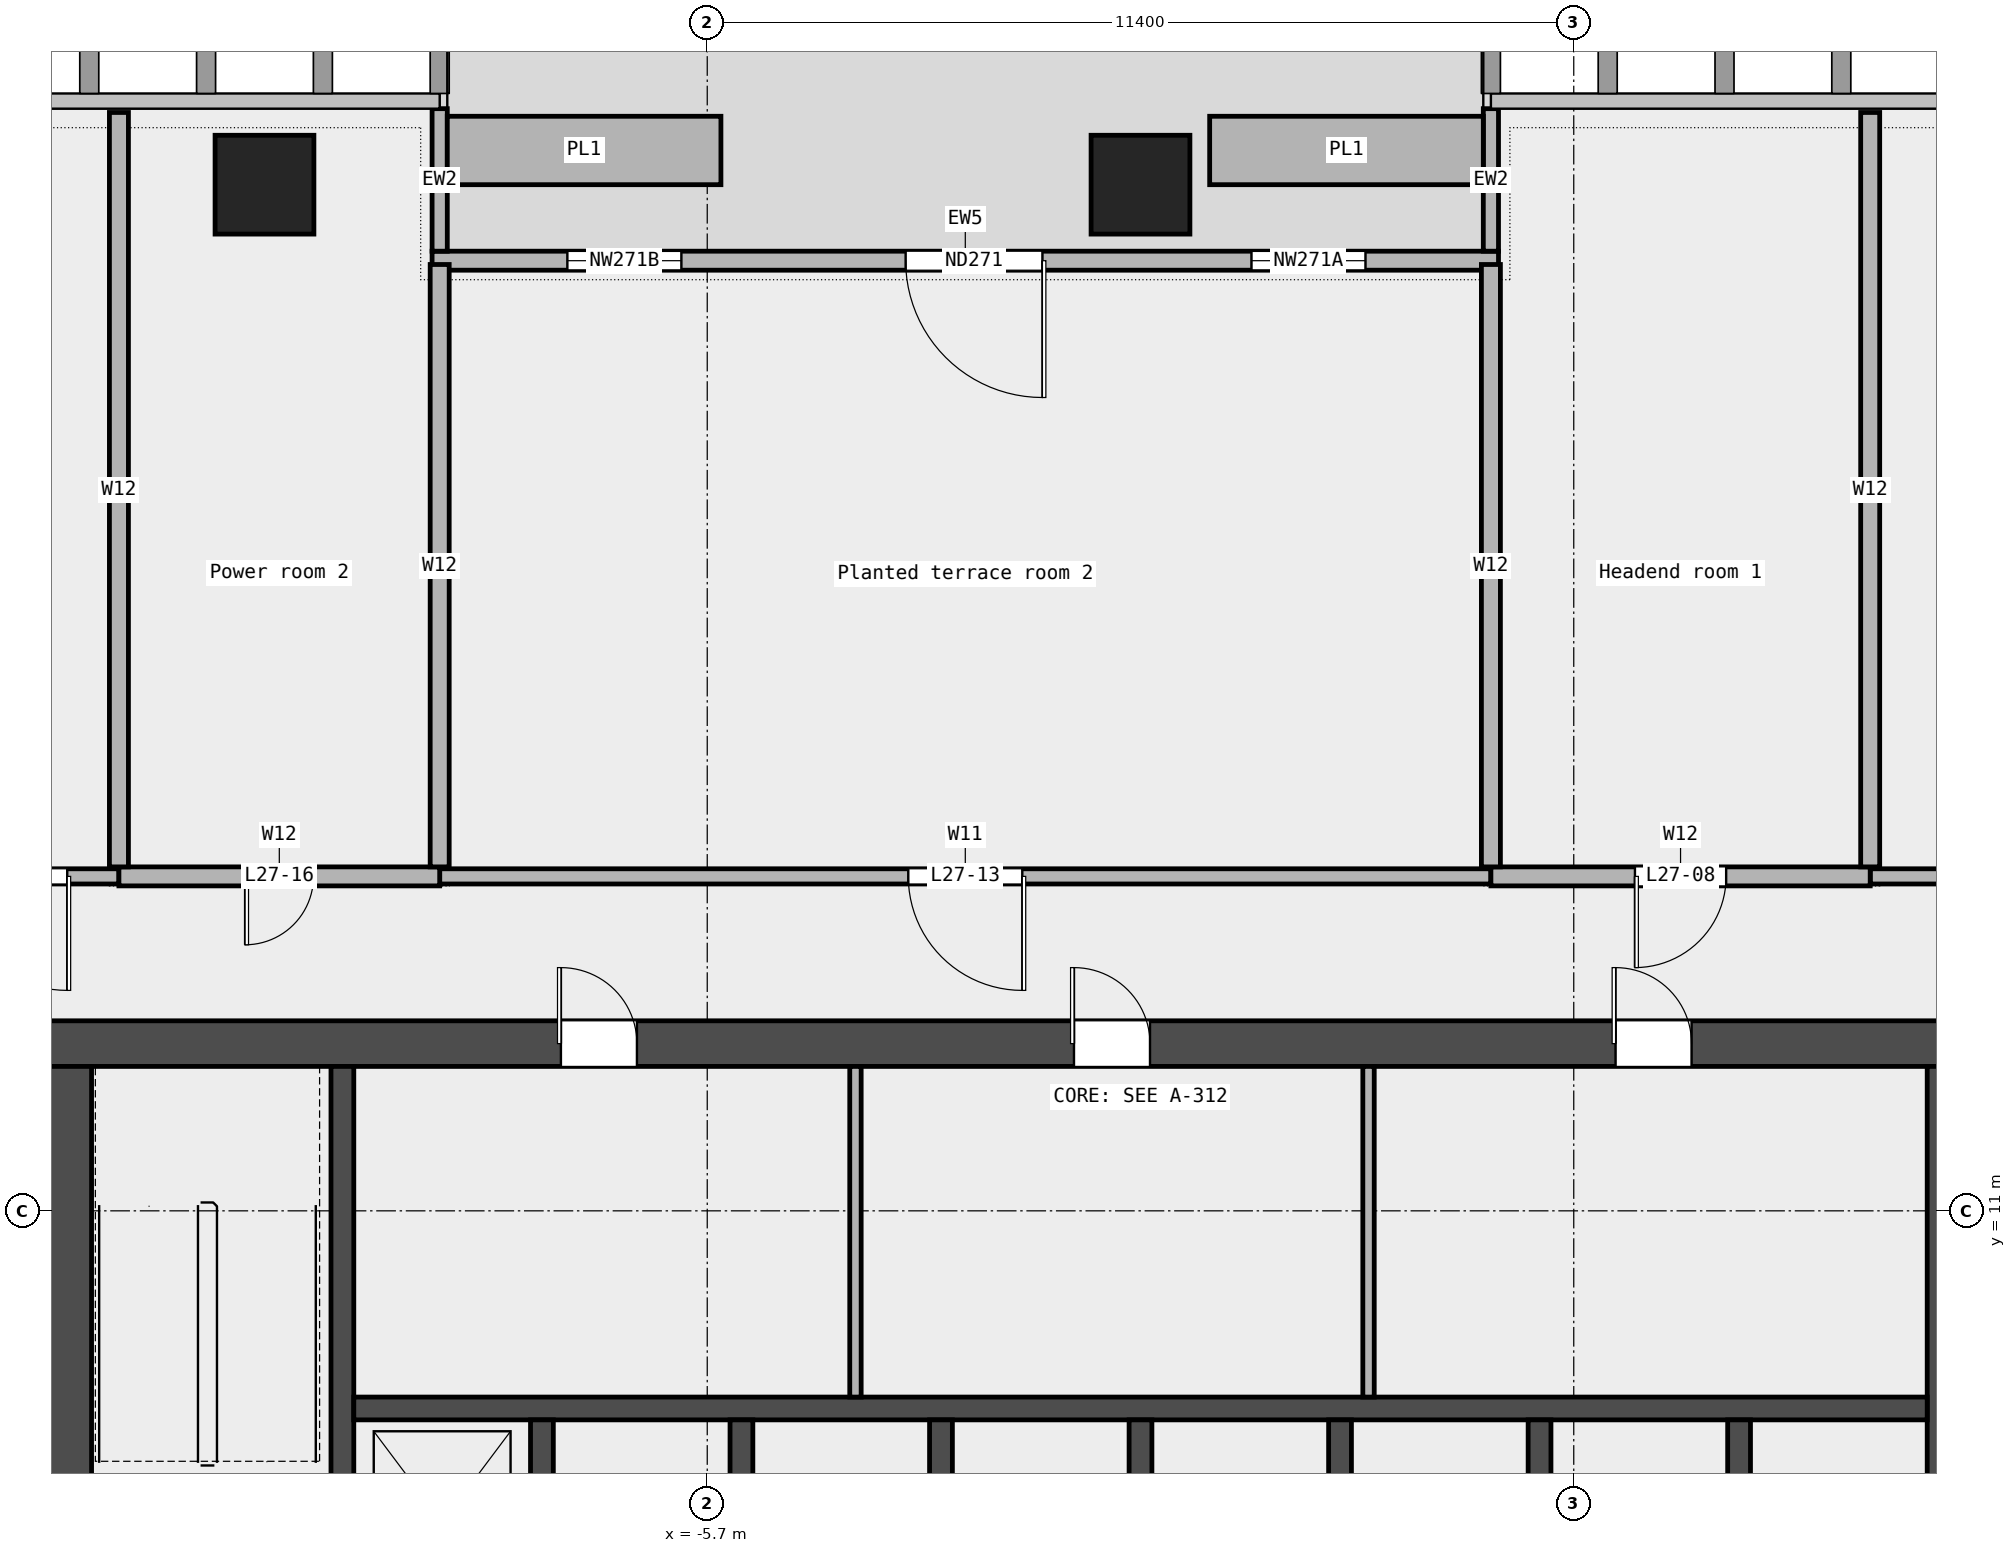
"""IFC4 building model, lengths in metres.
Left out: names, types, materials, properties, quantities, classifications, styles, units other than length and angle.
Written with IfcOpenShell. Run it as: python <this file> out.ifc"""

import sys

from ifc_helpers import new_model, si_unit, direction, frame, frame_2d, origin, origin_2d, place, context, subcontext, project, spatial, rectangle, extrude, element, fill, save


model = new_model("IFC4")
c1 = context("Model", 3, precision=1e-05, world=origin(), true_north=direction((0.0, 1.0)))
c2 = subcontext(c1, "Body", "Model", "MODEL_VIEW")
j1 = project(units=[si_unit("LENGTHUNIT", "METRE"), si_unit("PLANEANGLEUNIT", "RADIAN")], contexts=[c1])
p1 = place(None, origin())
s1 = spatial("IfcSite", under=j1, at=p1, CompositionType="ELEMENT")
p2 = place(p1, origin())
s2 = spatial("IfcBuilding", under=s1, at=p2, CompositionType="ELEMENT")
p3 = place(p2, frame((0.0, 0.0, 135.1)))
s3 = spatial("IfcBuildingStorey", under=s2, at=p3, CompositionType="ELEMENT", Elevation=135.1)
for number, where, z_axis, x_axis in (
    (1, (0.0, 24.5, 0.0), (0.0, 0.0, 1.0), (1.0, 0.0, 0.0)),
    (2, (-11.525, 24.5, 0.0), (0.0, 0.0, 1.0), (1.0, 0.0, 0.0)),
):
    element("IfcColumn", number, at=place(p3, frame(where, z_axis=z_axis, x_axis=x_axis)), inside=s3, PredefinedType="COLUMN", context=c2, shape_type="SweptSolid", body=[
        extrude(rectangle(XDim=1.3, YDim=1.3, at=origin_2d()), origin(), (0.0, 0.0, 1.0), 4.05),
    ])
p4 = place(p3, frame((4.71, 23.5, 0.0), z_axis=(0.0, 0.0, 1.0), x_axis=(-1.0, 0.0, 0.0)))
e3 = element("IfcWall", 3, at=p4, inside=s3, PredefinedType="STANDARD", context=c2, shape_type="SweptSolid", body=[
    extrude(rectangle(XDim=14.03, YDim=0.25, at=frame_2d((7.015, 0.0))), origin(), (0.0, 0.0, 1.0), 4.05),
])
p5 = place(p4, frame((1.75, 0.0, 0.45)))
e4 = element("IfcOpeningElement", 4, at=p5, cuts=e3, PredefinedType="OPENING", context=c2, shape_type="SweptSolid", body=[
    extrude(rectangle(XDim=1.5, YDim=3.0, at=frame_2d((0.75, 1.5))), frame((0.0, 0.137, 0.0), z_axis=(0.0, -1.0, 0.0), x_axis=(1.0, 0.0, 0.0)), (0.0, 0.0, 1.0), 0.274),
])
p6 = place(p4, frame((6.0, 0.0, 0.0)))
e5 = element("IfcOpeningElement", 5, at=p6, cuts=e3, PredefinedType="OPENING", context=c2, shape_type="SweptSolid", body=[
    extrude(rectangle(XDim=1.8, YDim=2.4, at=frame_2d((0.9, 1.2))), frame((0.0, 0.137, 0.0), z_axis=(0.0, -1.0, 0.0), x_axis=(1.0, 0.0, 0.0)), (0.0, 0.0, 1.0), 0.274),
])
p7 = place(p4, frame((10.75, 0.0, 0.45)))
e6 = element("IfcOpeningElement", 6, at=p7, cuts=e3, PredefinedType="OPENING", context=c2, shape_type="SweptSolid", body=[
    extrude(rectangle(XDim=1.5, YDim=3.0, at=frame_2d((0.75, 1.5))), frame((0.0, 0.137, 0.0), z_axis=(0.0, -1.0, 0.0), x_axis=(1.0, 0.0, 0.0)), (0.0, 0.0, 1.0), 0.274),
])
for number, where, z_axis, x_axis in (
    (7, (4.61, 25.5, 0.0), (0.0, 0.0, 1.0), (0.0, -1.0, 0.0)),
    (8, (-9.22, 25.5, 0.0), (0.0, 0.0, 1.0), (0.0, -1.0, 0.0)),
):
    element("IfcWall", number, at=place(p3, frame(where, z_axis=z_axis, x_axis=x_axis)), inside=s3, PredefinedType="STANDARD", context=c2, shape_type="SweptSolid", body=[
        extrude(rectangle(XDim=1.875, YDim=0.2, at=frame_2d((0.938, 0.0))), origin(), (0.0, 0.0, 1.0), 4.05),
    ])
for number, where, z_axis, x_axis in (
    (9, (4.51, 24.95, 0.0), (0.0, 0.0, 1.0), (-1.0, 0.0, 0.0)),
    (10, (-5.52, 24.95, 0.0), (0.0, 0.0, 1.0), (-1.0, 0.0, 0.0)),
):
    element("IfcWall", number, at=place(p3, frame(where, z_axis=z_axis, x_axis=x_axis)), inside=s3, PredefinedType="STANDARD", context=c2, shape_type="SweptSolid", body=[
        extrude(rectangle(XDim=3.6, YDim=0.9, at=frame_2d((1.8, 0.0))), origin(), (0.0, 0.0, 1.0), 0.7),
    ])
p8 = place(p3, frame((-16.3, 15.4, 0.0), z_axis=(0.0, 0.0, 1.0), x_axis=(1.0, 0.0, 0.0)))
e11 = element("IfcWall", 11, at=p8, inside=s3, PredefinedType="PARTITIONING", context=c2, shape_type="SweptSolid", body=[
    extrude(rectangle(XDim=2.86, YDim=0.2, at=frame_2d((1.43, 0.0))), origin(), (0.0, 0.0, 1.0), 4.05),
])
p9 = place(p8, frame((0.68, 0.0, 0.0)))
e12 = element("IfcOpeningElement", 12, at=p9, cuts=e11, PredefinedType="OPENING", context=c2, shape_type="SweptSolid", body=[
    extrude(rectangle(XDim=1.5, YDim=2.1, at=frame_2d((0.75, 1.05))), frame((0.0, 0.112, 0.0), z_axis=(0.0, -1.0, 0.0), x_axis=(1.0, 0.0, 0.0)), (0.0, 0.0, 1.0), 0.224),
])
p10 = place(p3, frame((-9.22, 15.4, 0.0), z_axis=(0.0, 0.0, 1.0), x_axis=(1.0, 0.0, 0.0)))
e13 = element("IfcWall", 13, at=p10, inside=s3, PredefinedType="PARTITIONING", context=c2, shape_type="SweptSolid", body=[
    extrude(rectangle(XDim=13.83, YDim=0.2, at=frame_2d((6.915, 0.0))), origin(), (0.0, 0.0, 1.0), 4.05),
])
p11 = place(p10, frame((6.165, 0.0, 0.0)))
e14 = element("IfcOpeningElement", 14, at=p11, cuts=e13, PredefinedType="OPENING", context=c2, shape_type="SweptSolid", body=[
    extrude(rectangle(XDim=1.5, YDim=2.1, at=frame_2d((0.75, 1.05))), frame((0.0, 0.112, 0.0), z_axis=(0.0, -1.0, 0.0), x_axis=(1.0, 0.0, 0.0)), (0.0, 0.0, 1.0), 0.224),
])
p12 = place(p3, frame((9.6, 15.4, 0.0), z_axis=(0.0, 0.0, 1.0), x_axis=(1.0, 0.0, 0.0)))
e15 = element("IfcWall", 15, at=p12, inside=s3, PredefinedType="PARTITIONING", context=c2, shape_type="SweptSolid", body=[
    extrude(rectangle(XDim=6.7, YDim=0.2, at=frame_2d((3.35, 0.0))), origin(), (0.0, 0.0, 1.0), 4.05),
])
p13 = place(p12, frame((2.45, 0.0, 0.0)))
e16 = element("IfcOpeningElement", 16, at=p13, cuts=e15, PredefinedType="OPENING", context=c2, shape_type="SweptSolid", body=[
    extrude(rectangle(XDim=1.8, YDim=2.1, at=frame_2d((0.9, 1.05))), frame((0.0, 0.112, 0.0), z_axis=(0.0, -1.0, 0.0), x_axis=(1.0, 0.0, 0.0)), (0.0, 0.0, 1.0), 0.224),
])
p14 = place(p3, frame((-13.44, 15.4, 0.0), z_axis=(0.0, 0.0, 1.0), x_axis=(1.0, 0.0, 0.0)))
e17 = element("IfcWall", 17, at=p14, inside=s3, PredefinedType="PARTITIONING", context=c2, shape_type="SweptSolid", body=[
    extrude(rectangle(XDim=4.22, YDim=0.25, at=frame_2d((2.11, 0.0))), origin(), (0.0, 0.0, 1.0), 4.05),
])
p15 = place(p14, frame((1.66, 0.0, 0.0)))
e18 = element("IfcOpeningElement", 18, at=p15, cuts=e17, PredefinedType="OPENING", context=c2, shape_type="SweptSolid", body=[
    extrude(rectangle(XDim=0.9, YDim=2.1, at=frame_2d((0.45, 1.05))), frame((0.0, 0.137, 0.0), z_axis=(0.0, -1.0, 0.0), x_axis=(1.0, 0.0, 0.0)), (0.0, 0.0, 1.0), 0.274),
])
p16 = place(p3, frame((4.61, 15.4, 0.0), z_axis=(0.0, 0.0, 1.0), x_axis=(1.0, 0.0, 0.0)))
e19 = element("IfcWall", 19, at=p16, inside=s3, PredefinedType="PARTITIONING", context=c2, shape_type="SweptSolid", body=[
    extrude(rectangle(XDim=4.99, YDim=0.25, at=frame_2d((2.495, 0.0))), origin(), (0.0, 0.0, 1.0), 4.05),
])
p17 = place(p16, frame((1.895, 0.0, 0.0)))
e20 = element("IfcOpeningElement", 20, at=p17, cuts=e19, PredefinedType="OPENING", context=c2, shape_type="SweptSolid", body=[
    extrude(rectangle(XDim=1.2, YDim=2.1, at=frame_2d((0.6, 1.05))), frame((0.0, 0.137, 0.0), z_axis=(0.0, -1.0, 0.0), x_axis=(1.0, 0.0, 0.0)), (0.0, 0.0, 1.0), 0.274),
])
p18 = place(p3, frame((-13.44, 15.525, 0.0), z_axis=(0.0, 0.0, 1.0), x_axis=(0.0, 1.0, 0.0)))
e21 = element("IfcWall", 21, at=p18, inside=s3, PredefinedType="PARTITIONING", context=c2, shape_type="SweptSolid", body=[
    extrude(rectangle(XDim=9.925, YDim=0.25, at=frame_2d((4.962, 0.0))), origin(), (0.0, 0.0, 1.0), 4.05),
])
for number, where, z_axis, x_axis in (
    (22, (-9.22, 15.525, 0.0), (0.0, 0.0, 1.0), (0.0, 1.0, 0.0)),
    (23, (4.61, 15.525, 0.0), (0.0, 0.0, 1.0), (0.0, 1.0, 0.0)),
):
    element("IfcWall", number, at=place(p3, frame(where, z_axis=z_axis, x_axis=x_axis)), inside=s3, PredefinedType="PARTITIONING", context=c2, shape_type="SweptSolid", body=[
        extrude(rectangle(XDim=7.925, YDim=0.25, at=frame_2d((3.962, 0.0))), origin(), (0.0, 0.0, 1.0), 4.05),
    ])
p19 = place(p3, frame((9.6, 15.525, 0.0), z_axis=(0.0, 0.0, 1.0), x_axis=(0.0, 1.0, 0.0)))
e24 = element("IfcWall", 24, at=p19, inside=s3, PredefinedType="PARTITIONING", context=c2, shape_type="SweptSolid", body=[
    extrude(rectangle(XDim=9.925, YDim=0.25, at=frame_2d((4.962, 0.0))), origin(), (0.0, 0.0, 1.0), 4.05),
])
p20 = place(p3, frame((-14.4, 13.2, 0.0), z_axis=(0.0, 0.0, 1.0), x_axis=(1.0, 0.0, 0.0)))
e25 = element("IfcWall", 25, at=p20, inside=s3, PredefinedType="SHEAR", context=c2, shape_type="SweptSolid", body=[
    extrude(rectangle(XDim=28.8, YDim=0.6, at=frame_2d((14.4, 0.0))), origin(), (0.0, 0.0, 1.0), 4.2),
])
p21 = place(p20, frame((6.775, 0.0, 0.0)))
e26 = element("IfcOpeningElement", 26, at=p21, cuts=e25, PredefinedType="OPENING", context=c2, shape_type="SweptSolid", body=[
    extrude(rectangle(XDim=1.0, YDim=2.1, at=frame_2d((0.5, 1.05))), frame((0.0, 0.312, 0.0), z_axis=(0.0, -1.0, 0.0), x_axis=(1.0, 0.0, 0.0)), (0.0, 0.0, 1.0), 0.624),
])
p22 = place(p20, frame((13.525, 0.0, 0.0)))
e27 = element("IfcOpeningElement", 27, at=p22, cuts=e25, PredefinedType="OPENING", context=c2, shape_type="SweptSolid", body=[
    extrude(rectangle(XDim=1.0, YDim=2.1, at=frame_2d((0.5, 1.05))), frame((0.0, 0.312, 0.0), z_axis=(0.0, -1.0, 0.0), x_axis=(1.0, 0.0, 0.0)), (0.0, 0.0, 1.0), 0.624),
])
p23 = place(p20, frame((20.65, 0.0, 0.0)))
e28 = element("IfcOpeningElement", 28, at=p23, cuts=e25, PredefinedType="OPENING", context=c2, shape_type="SweptSolid", body=[
    extrude(rectangle(XDim=1.0, YDim=2.1, at=frame_2d((0.5, 1.05))), frame((0.0, 0.312, 0.0), z_axis=(0.0, -1.0, 0.0), x_axis=(1.0, 0.0, 0.0)), (0.0, 0.0, 1.0), 0.624),
])
p24 = place(p3, frame((-14.1, -6.6, 0.0), z_axis=(0.0, 0.0, 1.0), x_axis=(0.0, 1.0, 0.0)))
e29 = element("IfcWall", 29, at=p24, inside=s3, PredefinedType="SHEAR", context=c2, shape_type="SweptSolid", body=[
    extrude(rectangle(XDim=19.5, YDim=0.6, at=frame_2d((9.75, 0.0))), origin(), (0.0, 0.0, 1.0), 4.2),
])
p25 = place(p24, frame((9.3, 0.0, 0.0)))
e30 = element("IfcOpeningElement", 30, at=p25, cuts=e29, PredefinedType="OPENING", context=c2, shape_type="SweptSolid", body=[
    extrude(rectangle(XDim=1.8, YDim=2.1, at=frame_2d((0.9, 1.05))), frame((0.0, 0.312, 0.0), z_axis=(0.0, -1.0, 0.0), x_axis=(1.0, 0.0, 0.0)), (0.0, 0.0, 1.0), 0.624),
])
for number, where, z_axis, x_axis in (
    (31, (-10.5, 5.25, 0.0), (0.0, 0.0, 1.0), (0.0, 1.0, 0.0)),
    (32, (10.5, 5.25, 0.0), (0.0, 0.0, 1.0), (0.0, 1.0, 0.0)),
):
    element("IfcWall", number, at=place(p3, frame(where, z_axis=z_axis, x_axis=x_axis)), inside=s3, PredefinedType="SHEAR", context=c2, shape_type="SweptSolid", body=[
        extrude(rectangle(XDim=7.65, YDim=0.3, at=frame_2d((3.825, 0.0))), origin(), (0.0, 0.0, 1.0), 4.2),
    ])
p26 = place(p3, frame((-10.35, 8.4, 0.0), z_axis=(0.0, 0.0, 1.0), x_axis=(1.0, 0.0, 0.0)))
e33 = element("IfcWall", 33, at=p26, inside=s3, PredefinedType="SOLIDWALL", context=c2, shape_type="SweptSolid", body=[
    extrude(rectangle(XDim=20.7, YDim=0.3, at=frame_2d((10.35, 0.0))), origin(), (0.0, 0.0, 1.0), 4.2),
])
for number, where, z_axis, x_axis in (
    (34, (-7.875, 5.55, 0.0), (0.0, 0.0, 1.0), (0.0, 1.0, 0.0)),
    (35, (-5.25, 5.55, 0.0), (0.0, 0.0, 1.0), (0.0, 1.0, 0.0)),
    (36, (-2.625, 5.55, 0.0), (0.0, 0.0, 1.0), (0.0, 1.0, 0.0)),
    (37, (0.0, 5.55, 0.0), (0.0, 0.0, 1.0), (0.0, 1.0, 0.0)),
    (38, (2.625, 5.55, 0.0), (0.0, 0.0, 1.0), (0.0, 1.0, 0.0)),
    (39, (5.25, 5.55, 0.0), (0.0, 0.0, 1.0), (0.0, 1.0, 0.0)),
    (40, (7.875, 5.55, 0.0), (0.0, 0.0, 1.0), (0.0, 1.0, 0.0)),
):
    element("IfcWall", number, at=place(p3, frame(where, z_axis=z_axis, x_axis=x_axis)), inside=s3, PredefinedType="SOLIDWALL", context=c2, shape_type="SweptSolid", body=[
        extrude(rectangle(XDim=2.7, YDim=0.3, at=frame_2d((1.35, 0.0))), origin(), (0.0, 0.0, 1.0), 4.2),
    ])
for number, where, z_axis, x_axis in (
    (41, (-3.75, 8.55, 0.0), (0.0, 0.0, 1.0), (0.0, 1.0, 0.0)),
    (42, (3.0, 8.55, 0.0), (0.0, 0.0, 1.0), (0.0, 1.0, 0.0)),
):
    element("IfcWall", number, at=place(p3, frame(where, z_axis=z_axis, x_axis=x_axis)), inside=s3, PredefinedType="PARTITIONING", context=c2, shape_type="SweptSolid", body=[
        extrude(rectangle(XDim=4.35, YDim=0.15, at=frame_2d((2.175, 0.0))), origin(), (0.0, 0.0, 1.0), 4.2),
    ])
p27 = place(p5, origin())
e43 = element("IfcWindow", 43, at=p27, inside=s3, PartitioningType="SINGLE_PANEL", PredefinedType="WINDOW", context=c2, shape_type="SweptSolid", body=[
    extrude(rectangle(XDim=1.5, YDim=3.0, at=frame_2d((0.75, 1.5))), frame((0.0, 0.03, 0.0), z_axis=(0.0, -1.0, 0.0), x_axis=(1.0, 0.0, 0.0)), (0.0, 0.0, 1.0), 0.06),
])
fill(e4, e43)
p28 = place(p6, origin())
e44 = element("IfcDoor", 44, at=p28, inside=s3, OperationType="DOUBLE_DOOR_SINGLE_SWING", PredefinedType="DOOR", context=c2, shape_type="SweptSolid", body=[
    extrude(rectangle(XDim=1.8, YDim=2.4, at=frame_2d((0.9, 1.2))), frame((0.0, 0.025, 0.0), z_axis=(0.0, -1.0, 0.0), x_axis=(1.0, 0.0, 0.0)), (0.0, 0.0, 1.0), 0.05),
])
fill(e5, e44)
p29 = place(p7, origin())
e45 = element("IfcWindow", 45, at=p29, inside=s3, PartitioningType="SINGLE_PANEL", PredefinedType="WINDOW", context=c2, shape_type="SweptSolid", body=[
    extrude(rectangle(XDim=1.5, YDim=3.0, at=frame_2d((0.75, 1.5))), frame((0.0, 0.03, 0.0), z_axis=(0.0, -1.0, 0.0), x_axis=(1.0, 0.0, 0.0)), (0.0, 0.0, 1.0), 0.06),
])
fill(e6, e45)
p30 = place(p17, origin())
e46 = element("IfcDoor", 46, at=p30, inside=s3, OperationType="SINGLE_SWING_RIGHT", PredefinedType="DOOR", context=c2, shape_type="SweptSolid", body=[
    extrude(rectangle(XDim=1.2, YDim=2.1, at=frame_2d((0.6, 1.05))), frame((0.0, 0.025, 0.0), z_axis=(0.0, -1.0, 0.0), x_axis=(1.0, 0.0, 0.0)), (0.0, 0.0, 1.0), 0.05),
])
fill(e20, e46)
p31 = place(p9, origin())
e47 = element("IfcDoor", 47, at=p31, inside=s3, OperationType="DOUBLE_DOOR_SINGLE_SWING", PredefinedType="DOOR", context=c2, shape_type="SweptSolid", body=[
    extrude(rectangle(XDim=1.5, YDim=2.1, at=frame_2d((0.75, 1.05))), frame((0.0, 0.025, 0.0), z_axis=(0.0, -1.0, 0.0), x_axis=(1.0, 0.0, 0.0)), (0.0, 0.0, 1.0), 0.05),
])
fill(e12, e47)
p32 = place(p11, origin())
e48 = element("IfcDoor", 48, at=p32, inside=s3, OperationType="DOUBLE_DOOR_SINGLE_SWING", PredefinedType="DOOR", context=c2, shape_type="SweptSolid", body=[
    extrude(rectangle(XDim=1.5, YDim=2.1, at=frame_2d((0.75, 1.05))), frame((0.0, 0.025, 0.0), z_axis=(0.0, -1.0, 0.0), x_axis=(1.0, 0.0, 0.0)), (0.0, 0.0, 1.0), 0.05),
])
fill(e14, e48)
p33 = place(p15, origin())
e49 = element("IfcDoor", 49, at=p33, inside=s3, OperationType="SINGLE_SWING_RIGHT", PredefinedType="DOOR", context=c2, shape_type="SweptSolid", body=[
    extrude(rectangle(XDim=0.9, YDim=2.1, at=frame_2d((0.45, 1.05))), frame((0.0, 0.025, 0.0), z_axis=(0.0, -1.0, 0.0), x_axis=(1.0, 0.0, 0.0)), (0.0, 0.0, 1.0), 0.05),
])
fill(e18, e49)
p34 = place(p21, origin())
e50 = element("IfcDoor", 50, at=p34, inside=s3, OperationType="SINGLE_SWING_LEFT", PredefinedType="DOOR", context=c2, shape_type="SweptSolid", body=[
    extrude(rectangle(XDim=1.0, YDim=2.1, at=frame_2d((0.5, 1.05))), frame((0.0, 0.025, 0.0), z_axis=(0.0, -1.0, 0.0), x_axis=(1.0, 0.0, 0.0)), (0.0, 0.0, 1.0), 0.05),
])
fill(e26, e50)
p35 = place(p22, origin())
e51 = element("IfcDoor", 51, at=p35, inside=s3, OperationType="SINGLE_SWING_LEFT", PredefinedType="DOOR", context=c2, shape_type="SweptSolid", body=[
    extrude(rectangle(XDim=1.0, YDim=2.1, at=frame_2d((0.5, 1.05))), frame((0.0, 0.025, 0.0), z_axis=(0.0, -1.0, 0.0), x_axis=(1.0, 0.0, 0.0)), (0.0, 0.0, 1.0), 0.05),
])
fill(e27, e51)
p36 = place(p23, origin())
e52 = element("IfcDoor", 52, at=p36, inside=s3, OperationType="SINGLE_SWING_LEFT", PredefinedType="DOOR", context=c2, shape_type="SweptSolid", body=[
    extrude(rectangle(XDim=1.0, YDim=2.1, at=frame_2d((0.5, 1.05))), frame((0.0, 0.025, 0.0), z_axis=(0.0, -1.0, 0.0), x_axis=(1.0, 0.0, 0.0)), (0.0, 0.0, 1.0), 0.05),
])
fill(e28, e52)
save(model, sys.argv[1])
